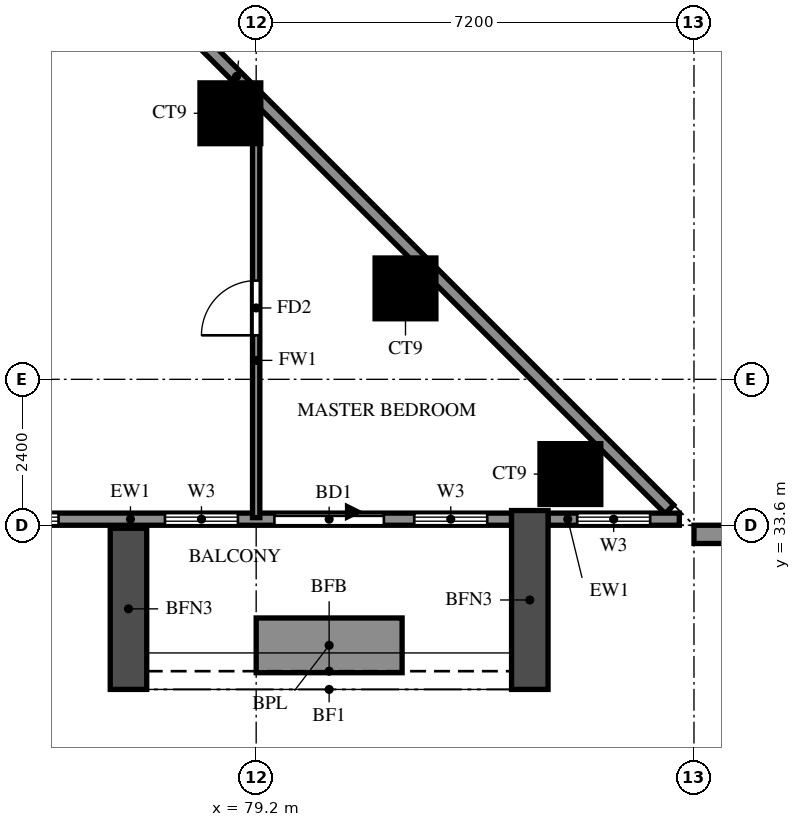
"""IFC4 building model, lengths in metres.
Left out: names, types, materials, properties, quantities, classifications, styles, units other than length and angle.
Written with IfcOpenShell. Run it as: python <this file> out.ifc"""

import sys

from ifc_helpers import new_model, si_unit, direction, frame, frame_2d, origin, origin_2d, place, context, subcontext, project, spatial, rectangle, extrude, source, transform, mapped, element, fill, save


model = new_model("IFC4")
c1 = context("Model", 3, precision=1e-05, world=origin(), true_north=direction((0.0, 1.0)))
c2 = subcontext(c1, "Body", "Model", "MODEL_VIEW")
j1 = project(units=[si_unit("LENGTHUNIT", "METRE"), si_unit("PLANEANGLEUNIT", "RADIAN")], contexts=[c1])
p1 = place(None, origin())
s1 = spatial("IfcSite", under=j1, at=p1, CompositionType="ELEMENT")
p2 = place(p1, origin())
s2 = spatial("IfcBuilding", under=s1, at=p2, CompositionType="ELEMENT")
p3 = place(p2, frame((0.0, 0.0, 62.0)))
s3 = spatial("IfcBuildingStorey", under=s2, at=p3, CompositionType="ELEMENT", Elevation=62.0)
m1 = source(origin(), c2, "Body", "SweptSolid", [
    extrude(rectangle(XDim=1.0, YDim=1.0, at=origin_2d()), origin(), (0.0, 0.0, 1.0), 3.18),
])
for number, where, z_axis, x_axis in (
    (1, (84.367, 34.442, 0.0), (0.0, 0.0, 1.0), (1.0, 0.0, 0.0)),
    (2, (81.656, 37.496, 0.0), (0.0, 0.0, 1.0), (1.0, 0.0, 0.0)),
    (3, (78.776, 40.376, 0.0), (0.0, 0.0, 1.0), (1.0, 0.0, 0.0)),
):
    element("IfcColumn", number, at=place(p3, frame(where, z_axis=z_axis, x_axis=x_axis)), inside=s3, PredefinedType="COLUMN", context=c2, shape_type="MappedRepresentation", body=[
        mapped(m1, transform((0.0, 0.0, 0.0))),
    ])
p4 = place(p3, frame((85.996, 33.863, 0.0), z_axis=(0.0, 0.0, 1.0), x_axis=(-0.707100718496, 0.707112843825, 0.0)))
e4 = element("IfcWall", 4, at=p4, inside=s3, PredefinedType="SOLIDWALL", context=c2, shape_type="SweptSolid", body=[
    extrude(rectangle(XDim=20.135, YDim=0.2, at=frame_2d((10.067, 0.0))), origin(), (0.0, 0.0, 1.0), 3.18),
])
p5 = place(p3, frame((72.5, 33.7, 0.0), z_axis=(0.0, 0.0, 1.0), x_axis=(1.0, 0.0, 0.0)))
e5 = element("IfcWall", 5, at=p5, inside=s3, PredefinedType="SOLIDWALL", context=c2, shape_type="SweptSolid", body=[
    extrude(rectangle(XDim=10.9, YDim=0.2, at=frame_2d((5.45, 0.0))), origin(), (0.0, 0.0, 1.0), 3.18),
])
p6 = place(p5, frame((7.0, 0.0, 0.0)))
e6 = element("IfcOpeningElement", 6, at=p6, cuts=e5, PredefinedType="OPENING", context=c2, shape_type="SweptSolid", body=[
    extrude(rectangle(XDim=1.8, YDim=2.4, at=frame_2d((0.9, 1.2))), frame((0.0, 0.11, 0.0), z_axis=(0.0, -1.0, 0.0), x_axis=(1.0, 0.0, 0.0)), (0.0, 0.0, 1.0), 0.22),
])
p7 = place(p5, frame((1.05, 0.0, 0.6)))
e7 = element("IfcOpeningElement", 7, at=p7, cuts=e5, PredefinedType="OPENING", context=c2, shape_type="SweptSolid", body=[
    extrude(rectangle(XDim=2.4, YDim=2.4, at=frame_2d((1.2, 1.2))), frame((0.0, 0.11, 0.0), z_axis=(0.0, -1.0, 0.0), x_axis=(1.0, 0.0, 0.0)), (0.0, 0.0, 1.0), 0.22),
])
p8 = place(p5, frame((5.2, 0.0, 0.6)))
e8 = element("IfcOpeningElement", 8, at=p8, cuts=e5, PredefinedType="OPENING", context=c2, shape_type="SweptSolid", body=[
    extrude(rectangle(XDim=1.2, YDim=2.4, at=frame_2d((0.6, 1.2))), frame((0.0, 0.11, 0.0), z_axis=(0.0, -1.0, 0.0), x_axis=(1.0, 0.0, 0.0)), (0.0, 0.0, 1.0), 0.22),
])
p9 = place(p5, frame((9.3, 0.0, 0.6)))
e9 = element("IfcOpeningElement", 9, at=p9, cuts=e5, PredefinedType="OPENING", context=c2, shape_type="SweptSolid", body=[
    extrude(rectangle(XDim=1.2, YDim=2.4, at=frame_2d((0.6, 1.2))), frame((0.0, 0.11, 0.0), z_axis=(0.0, -1.0, 0.0), x_axis=(1.0, 0.0, 0.0)), (0.0, 0.0, 1.0), 0.22),
])
p10 = place(p3, frame((84.0, 33.7, 0.0), z_axis=(0.0, 0.0, 1.0), x_axis=(1.0, 0.0, 0.0)))
e10 = element("IfcWall", 10, at=p10, inside=s3, PredefinedType="SOLIDWALL", context=c2, shape_type="SweptSolid", body=[
    extrude(rectangle(XDim=2.159, YDim=0.2, at=frame_2d((1.079, 0.0))), origin(), (0.0, 0.0, 1.0), 3.18),
])
p11 = place(p10, frame((0.479, 0.0, 0.6)))
e11 = element("IfcOpeningElement", 11, at=p11, cuts=e10, PredefinedType="OPENING", context=c2, shape_type="SweptSolid", body=[
    extrude(rectangle(XDim=1.2, YDim=2.4, at=frame_2d((0.6, 1.2))), frame((0.0, 0.11, 0.0), z_axis=(0.0, -1.0, 0.0), x_axis=(1.0, 0.0, 0.0)), (0.0, 0.0, 1.0), 0.22),
])
p12 = place(p3, frame((86.4, 33.45, -0.32), z_axis=(0.0, 0.0, 1.0), x_axis=(1.0, 0.0, 0.0)))
e12 = element("IfcWall", 12, at=p12, inside=s3, PredefinedType="SOLIDWALL", context=c2, shape_type="SweptSolid", body=[
    extrude(rectangle(XDim=2.4, YDim=0.3, at=frame_2d((1.2, 0.0))), origin(), (0.0, 0.0, 1.0), 3.5),
])
p13 = place(p3, frame((77.1, 33.55, 0.0), z_axis=(0.0, 0.0, 1.0), x_axis=(0.0, -1.0, 0.0)))
e13 = element("IfcWall", 13, at=p13, inside=s3, PredefinedType="SOLIDWALL", context=c2, shape_type="SweptSolid", body=[
    extrude(rectangle(XDim=2.65, YDim=0.6, at=frame_2d((1.325, 0.0))), origin(), (0.0, 0.0, 1.0), 2.85),
])
p14 = place(p3, frame((83.7, 33.842, 0.0), z_axis=(0.0, 0.0, 1.0), x_axis=(0.0, -1.0, 0.0)))
e14 = element("IfcWall", 14, at=p14, inside=s3, PredefinedType="SOLIDWALL", context=c2, shape_type="SweptSolid", body=[
    extrude(rectangle(XDim=2.942, YDim=0.6, at=frame_2d((1.471, 0.0))), origin(), (0.0, 0.0, 1.0), 2.85),
])
p15 = place(p3, frame((79.2, 31.625, 0.0), z_axis=(0.0, 0.0, 1.0), x_axis=(1.0, 0.0, 0.0)))
e15 = element("IfcWall", 15, at=p15, inside=s3, PredefinedType="SOLIDWALL", context=c2, shape_type="SweptSolid", body=[
    extrude(rectangle(XDim=2.4, YDim=0.9, at=frame_2d((1.2, 0.0))), origin(), (0.0, 0.0, 1.0), 0.9),
])
p16 = place(p3, frame((79.2, 33.725, 0.0), z_axis=(0.0, 0.0, 1.0), x_axis=(0.0, 1.0, 0.0)))
e16 = element("IfcWall", 16, at=p16, inside=s3, PredefinedType="PARTITIONING", context=c2, shape_type="SweptSolid", body=[
    extrude(rectangle(XDim=6.898, YDim=0.12, at=frame_2d((3.449, 0.0))), origin(), (0.0, 0.0, 1.0), 3.18),
])
p17 = place(p16, frame((2.999, 0.0, 0.0)))
e17 = element("IfcOpeningElement", 17, at=p17, cuts=e16, PredefinedType="OPENING", context=c2, shape_type="SweptSolid", body=[
    extrude(rectangle(XDim=0.9, YDim=2.1, at=frame_2d((0.45, 1.05))), frame((0.0, 0.07, 0.0), z_axis=(0.0, -1.0, 0.0), x_axis=(1.0, 0.0, 0.0)), (0.0, 0.0, 1.0), 0.14),
])
p18 = place(p6, origin())
e18 = element("IfcDoor", 18, at=p18, inside=s3, OperationType="DOUBLE_DOOR_SLIDING", PredefinedType="DOOR", context=c2, shape_type="SweptSolid", body=[
    extrude(rectangle(XDim=1.8, YDim=2.4, at=frame_2d((0.9, 1.2))), frame((0.0, 0.025, 0.0), z_axis=(0.0, -1.0, 0.0), x_axis=(1.0, 0.0, 0.0)), (0.0, 0.0, 1.0), 0.05),
])
fill(e6, e18)
p19 = place(p7, origin())
e19 = element("IfcWindow", 19, at=p19, inside=s3, PartitioningType="DOUBLE_PANEL_VERTICAL", PredefinedType="WINDOW", context=c2, shape_type="SweptSolid", body=[
    extrude(rectangle(XDim=2.4, YDim=2.4, at=frame_2d((1.2, 1.2))), frame((0.0, 0.03, 0.0), z_axis=(0.0, -1.0, 0.0), x_axis=(1.0, 0.0, 0.0)), (0.0, 0.0, 1.0), 0.06),
])
fill(e7, e19)
p20 = place(p8, origin())
e20 = element("IfcWindow", 20, at=p20, inside=s3, PartitioningType="SINGLE_PANEL", PredefinedType="WINDOW", context=c2, shape_type="SweptSolid", body=[
    extrude(rectangle(XDim=1.2, YDim=2.4, at=frame_2d((0.6, 1.2))), frame((0.0, 0.03, 0.0), z_axis=(0.0, -1.0, 0.0), x_axis=(1.0, 0.0, 0.0)), (0.0, 0.0, 1.0), 0.06),
])
fill(e8, e20)
p21 = place(p9, origin())
e21 = element("IfcWindow", 21, at=p21, inside=s3, PartitioningType="SINGLE_PANEL", PredefinedType="WINDOW", context=c2, shape_type="SweptSolid", body=[
    extrude(rectangle(XDim=1.2, YDim=2.4, at=frame_2d((0.6, 1.2))), frame((0.0, 0.03, 0.0), z_axis=(0.0, -1.0, 0.0), x_axis=(1.0, 0.0, 0.0)), (0.0, 0.0, 1.0), 0.06),
])
fill(e9, e21)
p22 = place(p11, origin())
e22 = element("IfcWindow", 22, at=p22, inside=s3, PartitioningType="SINGLE_PANEL", PredefinedType="WINDOW", context=c2, shape_type="SweptSolid", body=[
    extrude(rectangle(XDim=1.2, YDim=2.4, at=frame_2d((0.6, 1.2))), frame((0.0, 0.03, 0.0), z_axis=(0.0, -1.0, 0.0), x_axis=(1.0, 0.0, 0.0)), (0.0, 0.0, 1.0), 0.06),
])
fill(e11, e22)
p23 = place(p17, origin())
e23 = element("IfcDoor", 23, at=p23, inside=s3, OperationType="SINGLE_SWING_RIGHT", PredefinedType="DOOR", context=c2, shape_type="SweptSolid", body=[
    extrude(rectangle(XDim=0.9, YDim=2.1, at=frame_2d((0.45, 1.05))), frame((0.0, 0.025, 0.0), z_axis=(0.0, -1.0, 0.0), x_axis=(1.0, 0.0, 0.0)), (0.0, 0.0, 1.0), 0.05),
])
fill(e17, e23)
save(model, sys.argv[1])
